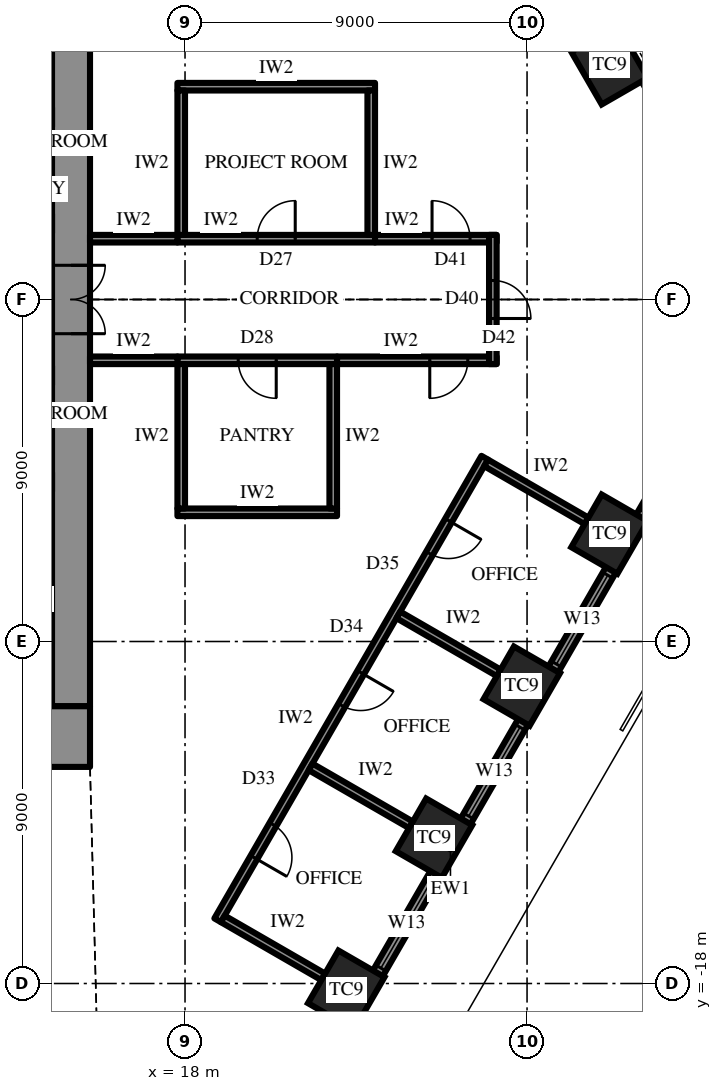
"""IFC4 building model, lengths in metres.
Left out: names, types, materials, properties, quantities, classifications, styles, units other than length and angle.
Written with IfcOpenShell. Run it as: python <this file> out.ifc"""

import sys

from ifc_helpers import new_model, si_unit, direction, frame, frame_2d, origin, origin_2d, place, context, subcontext, project, spatial, rectangle, extrude, element, fill, save


model = new_model("IFC4")
c1 = context("Model", 3, precision=1e-05, world=origin(), true_north=direction((0.0, 1.0)))
c2 = subcontext(c1, "Body", "Model", "MODEL_VIEW")
j1 = project(units=[si_unit("LENGTHUNIT", "METRE"), si_unit("PLANEANGLEUNIT", "RADIAN")], contexts=[c1])
p1 = place(None, origin())
s1 = spatial("IfcSite", under=j1, at=p1, CompositionType="ELEMENT")
p2 = place(p1, origin())
s2 = spatial("IfcBuilding", under=s1, at=p2, CompositionType="ELEMENT")
p3 = place(p2, frame((0.0, 0.0, 228.1)))
s3 = spatial("IfcBuildingStorey", under=s2, at=p3, CompositionType="ELEMENT", Elevation=228.1)
for number, where, z_axis, x_axis in (
    (1, (29.171, 6.175, 0.0), (0.0, 0.0, 1.0), (-0.5, 0.866, 0.0)),
    (2, (22.242, -18.175, 0.0), (0.0, 0.0, 1.0), (0.5, 0.866, 0.0)),
    (3, (24.552, -14.175, 0.0), (0.0, 0.0, 1.0), (0.5, 0.866, 0.0)),
    (4, (26.861, -10.175, 0.0), (0.0, 0.0, 1.0), (0.5, 0.866, 0.0)),
    (5, (29.171, -6.175, 0.0), (0.0, 0.0, 1.0), (0.5, 0.866, 0.0)),
):
    element("IfcColumn", number, at=place(p3, frame(where, z_axis=z_axis, x_axis=x_axis)), inside=s3, PredefinedType="COLUMN", context=c2, shape_type="SweptSolid", body=[
        extrude(rectangle(XDim=1.6, YDim=1.4, at=origin_2d()), origin(), (0.0, 0.0, 1.0), 4.2),
    ])
p4 = place(p3, frame((15.5, -11.5, 0.0), z_axis=(0.0, 0.0, 1.0), x_axis=(-1.0, 0.0, 0.0)))
e6 = element("IfcWall", 6, at=p4, inside=s3, PredefinedType="SHEAR", context=c2, shape_type="SweptSolid", body=[
    extrude(rectangle(XDim=31.0, YDim=1.6, at=frame_2d((15.5, 0.0))), origin(), (0.0, 0.0, 1.0), 4.2),
])
p5 = place(p4, frame((16.35, 0.0, 0.0)))
e7 = element("IfcOpeningElement", 7, at=p5, cuts=e6, PredefinedType="OPENING", context=c2, shape_type="SweptSolid", body=[
    extrude(rectangle(XDim=0.9, YDim=2.2, at=frame_2d((0.45, 1.1))), frame((0.0, 0.81, 0.0), z_axis=(0.0, -1.0, 0.0), x_axis=(1.0, 0.0, 0.0)), (0.0, 0.0, 1.0), 1.62),
])
p6 = place(p4, frame((19.35, 0.0, 0.0)))
e8 = element("IfcOpeningElement", 8, at=p6, cuts=e6, PredefinedType="OPENING", context=c2, shape_type="SweptSolid", body=[
    extrude(rectangle(XDim=0.9, YDim=2.2, at=frame_2d((0.45, 1.1))), frame((0.0, 0.81, 0.0), z_axis=(0.0, -1.0, 0.0), x_axis=(1.0, 0.0, 0.0)), (0.0, 0.0, 1.0), 1.62),
])
p7 = place(p4, frame((22.4, 0.0, 0.0)))
e9 = element("IfcOpeningElement", 9, at=p7, cuts=e6, PredefinedType="OPENING", context=c2, shape_type="SweptSolid", body=[
    extrude(rectangle(XDim=1.0, YDim=2.2, at=frame_2d((0.5, 1.1))), frame((0.0, 0.81, 0.0), z_axis=(0.0, -1.0, 0.0), x_axis=(1.0, 0.0, 0.0)), (0.0, 0.0, 1.0), 1.62),
])
p8 = place(p4, frame((1.65, 0.0, 0.0)))
e10 = element("IfcOpeningElement", 10, at=p8, cuts=e6, PredefinedType="OPENING", context=c2, shape_type="SweptSolid", body=[
    extrude(rectangle(XDim=0.9, YDim=2.2, at=frame_2d((0.45, 1.1))), frame((0.0, 0.81, 0.0), z_axis=(0.0, -1.0, 0.0), x_axis=(1.0, 0.0, 0.0)), (0.0, 0.0, 1.0), 1.62),
])
p9 = place(p4, frame((4.65, 0.0, 0.0)))
e11 = element("IfcOpeningElement", 11, at=p9, cuts=e6, PredefinedType="OPENING", context=c2, shape_type="SweptSolid", body=[
    extrude(rectangle(XDim=0.9, YDim=2.2, at=frame_2d((0.45, 1.1))), frame((0.0, 0.81, 0.0), z_axis=(0.0, -1.0, 0.0), x_axis=(1.0, 0.0, 0.0)), (0.0, 0.0, 1.0), 1.62),
])
p10 = place(p4, frame((25.45, 0.0, 0.0)))
e12 = element("IfcOpeningElement", 12, at=p10, cuts=e6, PredefinedType="OPENING", context=c2, shape_type="SweptSolid", body=[
    extrude(rectangle(XDim=0.9, YDim=2.2, at=frame_2d((0.45, 1.1))), frame((0.0, 0.81, 0.0), z_axis=(0.0, -1.0, 0.0), x_axis=(1.0, 0.0, 0.0)), (0.0, 0.0, 1.0), 1.62),
])
p11 = place(p4, frame((28.45, 0.0, 0.0)))
e13 = element("IfcOpeningElement", 13, at=p11, cuts=e6, PredefinedType="OPENING", context=c2, shape_type="SweptSolid", body=[
    extrude(rectangle(XDim=0.9, YDim=2.2, at=frame_2d((0.45, 1.1))), frame((0.0, 0.81, 0.0), z_axis=(0.0, -1.0, 0.0), x_axis=(1.0, 0.0, 0.0)), (0.0, 0.0, 1.0), 1.62),
])
p12 = place(p3, frame((15.0, -10.7, 0.0), z_axis=(0.0, 0.0, 1.0), x_axis=(0.0, 1.0, 0.0)))
e14 = element("IfcWall", 14, at=p12, inside=s3, PredefinedType="SHEAR", context=c2, shape_type="SweptSolid", body=[
    extrude(rectangle(XDim=21.4, YDim=1.0, at=frame_2d((10.7, 0.0))), origin(), (0.0, 0.0, 1.0), 4.2),
])
p13 = place(p12, frame((9.8, 0.0, 0.0)))
e15 = element("IfcOpeningElement", 15, at=p13, cuts=e14, PredefinedType="OPENING", context=c2, shape_type="SweptSolid", body=[
    extrude(rectangle(XDim=1.8, YDim=2.4, at=frame_2d((0.9, 1.2))), frame((0.0, 0.51, 0.0), z_axis=(0.0, -1.0, 0.0), x_axis=(1.0, 0.0, 0.0)), (0.0, 0.0, 1.0), 1.02),
])
p14 = place(p3, frame((12.3, 2.0, 0.0), z_axis=(0.0, 0.0, 1.0), x_axis=(1.0, 0.0, 0.0)))
e16 = element("IfcWall", 16, at=p14, inside=s3, PredefinedType="SHEAR", context=c2, shape_type="SweptSolid", body=[
    extrude(rectangle(XDim=2.2, YDim=0.5, at=frame_2d((1.1, 0.0))), origin(), (0.0, 0.0, 1.0), 4.2),
])
p15 = place(p14, frame((0.8, 0.0, 0.0)))
e17 = element("IfcOpeningElement", 17, at=p15, cuts=e16, PredefinedType="OPENING", context=c2, shape_type="SweptSolid", body=[
    extrude(rectangle(XDim=0.9, YDim=2.2, at=frame_2d((0.45, 1.1))), frame((0.0, 0.26, 0.0), z_axis=(0.0, -1.0, 0.0), x_axis=(1.0, 0.0, 0.0)), (0.0, 0.0, 1.0), 0.52),
])
p16 = place(p3, frame((12.3, 4.8, 0.0), z_axis=(0.0, 0.0, 1.0), x_axis=(1.0, 0.0, 0.0)))
e18 = element("IfcWall", 18, at=p16, inside=s3, PredefinedType="SHEAR", context=c2, shape_type="SweptSolid", body=[
    extrude(rectangle(XDim=2.2, YDim=0.5, at=frame_2d((1.1, 0.0))), origin(), (0.0, 0.0, 1.0), 4.2),
])
p17 = place(p3, frame((18.057, -26.425, 0.0), z_axis=(0.0, 0.0, 1.0), x_axis=(0.500001051461, 0.866024796723, 0.0)))
e19 = element("IfcWall", 19, at=p17, inside=s3, PredefinedType="SOLIDWALL", context=c2, shape_type="SweptSolid", body=[
    extrude(rectangle(XDim=27.713, YDim=0.3, at=frame_2d((13.856, 0.0))), origin(), (0.0, 0.0, 1.0), 2.0),
])
p18 = place(p17, frame((0.959, 0.0, 0.6)))
e20 = element("IfcOpeningElement", 20, at=p18, cuts=e19, PredefinedType="OPENING", context=c2, shape_type="SweptSolid", body=[
    extrude(rectangle(XDim=2.7, YDim=1.15, at=frame_2d((1.35, 0.575))), frame((0.0, 0.16, 0.0), z_axis=(0.0, -1.0, 0.0), x_axis=(1.0, 0.0, 0.0)), (0.0, 0.0, 1.0), 0.32),
])
p19 = place(p17, frame((5.578, 0.0, 0.6)))
e21 = element("IfcOpeningElement", 21, at=p19, cuts=e19, PredefinedType="OPENING", context=c2, shape_type="SweptSolid", body=[
    extrude(rectangle(XDim=2.7, YDim=1.15, at=frame_2d((1.35, 0.575))), frame((0.0, 0.16, 0.0), z_axis=(0.0, -1.0, 0.0), x_axis=(1.0, 0.0, 0.0)), (0.0, 0.0, 1.0), 0.32),
])
p20 = place(p17, frame((10.197, 0.0, 0.6)))
e22 = element("IfcOpeningElement", 22, at=p20, cuts=e19, PredefinedType="OPENING", context=c2, shape_type="SweptSolid", body=[
    extrude(rectangle(XDim=2.7, YDim=1.15, at=frame_2d((1.35, 0.575))), frame((0.0, 0.16, 0.0), z_axis=(0.0, -1.0, 0.0), x_axis=(1.0, 0.0, 0.0)), (0.0, 0.0, 1.0), 0.32),
])
p21 = place(p17, frame((14.816, 0.0, 0.6)))
e23 = element("IfcOpeningElement", 23, at=p21, cuts=e19, PredefinedType="OPENING", context=c2, shape_type="SweptSolid", body=[
    extrude(rectangle(XDim=2.7, YDim=1.15, at=frame_2d((1.35, 0.575))), frame((0.0, 0.16, 0.0), z_axis=(0.0, -1.0, 0.0), x_axis=(1.0, 0.0, 0.0)), (0.0, 0.0, 1.0), 0.32),
])
p22 = place(p17, frame((19.435, 0.0, 0.6)))
e24 = element("IfcOpeningElement", 24, at=p22, cuts=e19, PredefinedType="OPENING", context=c2, shape_type="SweptSolid", body=[
    extrude(rectangle(XDim=2.7, YDim=1.15, at=frame_2d((1.35, 0.575))), frame((0.0, 0.16, 0.0), z_axis=(0.0, -1.0, 0.0), x_axis=(1.0, 0.0, 0.0)), (0.0, 0.0, 1.0), 0.32),
])
p23 = place(p17, frame((24.053, 0.0, 0.6)))
e25 = element("IfcOpeningElement", 25, at=p23, cuts=e19, PredefinedType="OPENING", context=c2, shape_type="SweptSolid", body=[
    extrude(rectangle(XDim=2.7, YDim=1.15, at=frame_2d((1.35, 0.575))), frame((0.0, 0.16, 0.0), z_axis=(0.0, -1.0, 0.0), x_axis=(1.0, 0.0, 0.0)), (0.0, 0.0, 1.0), 0.32),
])
p24 = place(p3, frame((18.858, -16.337, 0.0), z_axis=(0.0, 0.0, 1.0), x_axis=(0.500002095642, 0.866024193862, 0.0)))
e26 = element("IfcWall", 26, at=p24, inside=s3, PredefinedType="PARTITIONING", context=c2, shape_type="SweptSolid", body=[
    extrude(rectangle(XDim=14.057, YDim=0.2, at=frame_2d((7.028, 0.0))), origin(), (0.0, 0.0, 1.0), 4.0),
])
p25 = place(p24, frame((1.909, 0.0, 0.0)))
e27 = element("IfcOpeningElement", 27, at=p25, cuts=e26, PredefinedType="OPENING", context=c2, shape_type="SweptSolid", body=[
    extrude(rectangle(XDim=1.0, YDim=2.2, at=frame_2d((0.5, 1.1))), frame((0.0, 0.11, 0.0), z_axis=(0.0, -1.0, 0.0), x_axis=(1.0, 0.0, 0.0)), (0.0, 0.0, 1.0), 0.22),
])
p26 = place(p24, frame((6.528, 0.0, 0.0)))
e28 = element("IfcOpeningElement", 28, at=p26, cuts=e26, PredefinedType="OPENING", context=c2, shape_type="SweptSolid", body=[
    extrude(rectangle(XDim=1.0, YDim=2.2, at=frame_2d((0.5, 1.1))), frame((0.0, 0.11, 0.0), z_axis=(0.0, -1.0, 0.0), x_axis=(1.0, 0.0, 0.0)), (0.0, 0.0, 1.0), 0.22),
])
p27 = place(p24, frame((11.147, 0.0, 0.0)))
e29 = element("IfcOpeningElement", 29, at=p27, cuts=e26, PredefinedType="OPENING", context=c2, shape_type="SweptSolid", body=[
    extrude(rectangle(XDim=1.0, YDim=2.2, at=frame_2d((0.5, 1.1))), frame((0.0, 0.11, 0.0), z_axis=(0.0, -1.0, 0.0), x_axis=(1.0, 0.0, 0.0)), (0.0, 0.0, 1.0), 0.22),
])
for number, where, z_axis, x_axis in (
    (30, (18.995, -16.3, 0.0), (0.0, 0.0, 1.0), (0.866, -0.5, 0.0)),
    (31, (21.304, -12.3, 0.0), (0.0, 0.0, 1.0), (0.866, -0.5, 0.0)),
    (32, (23.614, -8.3, 0.0), (0.0, 0.0, 1.0), (0.866, -0.5, 0.0)),
    (33, (25.923, -4.3, 0.0), (0.0, 0.0, 1.0), (0.866, -0.5, 0.0)),
):
    element("IfcWall", number, at=place(p3, frame(where, z_axis=z_axis, x_axis=x_axis)), inside=s3, PredefinedType="PARTITIONING", context=c2, shape_type="SweptSolid", body=[
        extrude(rectangle(XDim=3.05, YDim=0.2, at=frame_2d((1.525, 0.0))), origin(), (0.0, 0.0, 1.0), 3.082),
    ])
p28 = place(p3, frame((17.8, 1.6, 0.0), z_axis=(0.0, 0.0, 1.0), x_axis=(1.0, 0.0, 0.0)))
e34 = element("IfcWall", 34, at=p28, inside=s3, PredefinedType="PARTITIONING", context=c2, shape_type="SweptSolid", body=[
    extrude(rectangle(XDim=5.2, YDim=0.2, at=frame_2d((2.6, 0.0))), origin(), (0.0, 0.0, 1.0), 4.0),
])
p29 = place(p28, frame((2.1, 0.0, 0.0)))
e35 = element("IfcOpeningElement", 35, at=p29, cuts=e34, PredefinedType="OPENING", context=c2, shape_type="SweptSolid", body=[
    extrude(rectangle(XDim=1.0, YDim=2.2, at=frame_2d((0.5, 1.1))), frame((0.0, 0.11, 0.0), z_axis=(0.0, -1.0, 0.0), x_axis=(1.0, 0.0, 0.0)), (0.0, 0.0, 1.0), 0.22),
])
p30 = place(p3, frame((17.8, 5.6, 0.0), z_axis=(0.0, 0.0, 1.0), x_axis=(1.0, 0.0, 0.0)))
e36 = element("IfcWall", 36, at=p30, inside=s3, PredefinedType="PARTITIONING", context=c2, shape_type="SweptSolid", body=[
    extrude(rectangle(XDim=5.2, YDim=0.2, at=frame_2d((2.6, 0.0))), origin(), (0.0, 0.0, 1.0), 4.0),
])
for number, where, z_axis, x_axis in (
    (37, (17.9, 1.7, 0.0), (0.0, 0.0, 1.0), (0.0, 1.0, 0.0)),
    (38, (22.9, 1.7, 0.0), (0.0, 0.0, 1.0), (0.0, 1.0, 0.0)),
):
    element("IfcWall", number, at=place(p3, frame(where, z_axis=z_axis, x_axis=x_axis)), inside=s3, PredefinedType="PARTITIONING", context=c2, shape_type="SweptSolid", body=[
        extrude(rectangle(XDim=3.8, YDim=0.2, at=frame_2d((1.9, 0.0))), origin(), (0.0, 0.0, 1.0), 4.0),
    ])
p31 = place(p3, frame((17.8, -1.6, 0.0), z_axis=(0.0, 0.0, 1.0), x_axis=(1.0, 0.0, 0.0)))
e39 = element("IfcWall", 39, at=p31, inside=s3, PredefinedType="PARTITIONING", context=c2, shape_type="SweptSolid", body=[
    extrude(rectangle(XDim=4.2, YDim=0.2, at=frame_2d((2.1, 0.0))), origin(), (0.0, 0.0, 1.0), 4.0),
])
p32 = place(p31, frame((1.6, 0.0, 0.0)))
e40 = element("IfcOpeningElement", 40, at=p32, cuts=e39, PredefinedType="OPENING", context=c2, shape_type="SweptSolid", body=[
    extrude(rectangle(XDim=1.0, YDim=2.2, at=frame_2d((0.5, 1.1))), frame((0.0, 0.11, 0.0), z_axis=(0.0, -1.0, 0.0), x_axis=(1.0, 0.0, 0.0)), (0.0, 0.0, 1.0), 0.22),
])
p33 = place(p3, frame((17.8, -5.6, 0.0), z_axis=(0.0, 0.0, 1.0), x_axis=(1.0, 0.0, 0.0)))
e41 = element("IfcWall", 41, at=p33, inside=s3, PredefinedType="PARTITIONING", context=c2, shape_type="SweptSolid", body=[
    extrude(rectangle(XDim=4.2, YDim=0.2, at=frame_2d((2.1, 0.0))), origin(), (0.0, 0.0, 1.0), 4.0),
])
for number, where, z_axis, x_axis in (
    (42, (17.9, -1.7, 0.0), (0.0, 0.0, 1.0), (0.0, -1.0, 0.0)),
    (43, (21.9, -1.7, 0.0), (0.0, 0.0, 1.0), (0.0, -1.0, 0.0)),
):
    element("IfcWall", number, at=place(p3, frame(where, z_axis=z_axis, x_axis=x_axis)), inside=s3, PredefinedType="PARTITIONING", context=c2, shape_type="SweptSolid", body=[
        extrude(rectangle(XDim=3.8, YDim=0.2, at=frame_2d((1.9, 0.0))), origin(), (0.0, 0.0, 1.0), 4.0),
    ])
p34 = place(p3, frame((15.5, 1.6, 0.0), z_axis=(0.0, 0.0, 1.0), x_axis=(1.0, 0.0, 0.0)))
e44 = element("IfcWall", 44, at=p34, inside=s3, PredefinedType="PARTITIONING", context=c2, shape_type="SweptSolid", body=[
    extrude(rectangle(XDim=2.3, YDim=0.2, at=frame_2d((1.15, 0.0))), origin(), (0.0, 0.0, 1.0), 4.0),
])
p35 = place(p3, frame((23.0, 1.6, 0.0), z_axis=(0.0, 0.0, 1.0), x_axis=(1.0, 0.0, 0.0)))
e45 = element("IfcWall", 45, at=p35, inside=s3, PredefinedType="PARTITIONING", context=c2, shape_type="SweptSolid", body=[
    extrude(rectangle(XDim=3.2, YDim=0.2, at=frame_2d((1.6, 0.0))), origin(), (0.0, 0.0, 1.0), 4.0),
])
p36 = place(p35, frame((1.5, 0.0, 0.0)))
e46 = element("IfcOpeningElement", 46, at=p36, cuts=e45, PredefinedType="OPENING", context=c2, shape_type="SweptSolid", body=[
    extrude(rectangle(XDim=1.0, YDim=2.2, at=frame_2d((0.5, 1.1))), frame((0.0, 0.11, 0.0), z_axis=(0.0, -1.0, 0.0), x_axis=(1.0, 0.0, 0.0)), (0.0, 0.0, 1.0), 0.22),
])
p37 = place(p3, frame((15.5, -1.6, 0.0), z_axis=(0.0, 0.0, 1.0), x_axis=(1.0, 0.0, 0.0)))
e47 = element("IfcWall", 47, at=p37, inside=s3, PredefinedType="PARTITIONING", context=c2, shape_type="SweptSolid", body=[
    extrude(rectangle(XDim=2.3, YDim=0.2, at=frame_2d((1.15, 0.0))), origin(), (0.0, 0.0, 1.0), 4.0),
])
p38 = place(p3, frame((22.0, -1.6, 0.0), z_axis=(0.0, 0.0, 1.0), x_axis=(1.0, 0.0, 0.0)))
e48 = element("IfcWall", 48, at=p38, inside=s3, PredefinedType="PARTITIONING", context=c2, shape_type="SweptSolid", body=[
    extrude(rectangle(XDim=4.2, YDim=0.2, at=frame_2d((2.1, 0.0))), origin(), (0.0, 0.0, 1.0), 4.0),
])
p39 = place(p38, frame((2.44, 0.0, 0.0)))
e49 = element("IfcOpeningElement", 49, at=p39, cuts=e48, PredefinedType="OPENING", context=c2, shape_type="SweptSolid", body=[
    extrude(rectangle(XDim=1.0, YDim=2.2, at=frame_2d((0.5, 1.1))), frame((0.0, 0.11, 0.0), z_axis=(0.0, -1.0, 0.0), x_axis=(1.0, 0.0, 0.0)), (0.0, 0.0, 1.0), 0.22),
])
p40 = place(p3, frame((26.1, -1.7, 0.0), z_axis=(0.0, 0.0, 1.0), x_axis=(0.0, 1.0, 0.0)))
e50 = element("IfcWall", 50, at=p40, inside=s3, PredefinedType="PARTITIONING", context=c2, shape_type="SweptSolid", body=[
    extrude(rectangle(XDim=3.4, YDim=0.2, at=frame_2d((1.7, 0.0))), origin(), (0.0, 0.0, 1.0), 4.0),
])
p41 = place(p40, frame((1.2, 0.0, 0.0)))
e51 = element("IfcOpeningElement", 51, at=p41, cuts=e50, PredefinedType="OPENING", context=c2, shape_type="SweptSolid", body=[
    extrude(rectangle(XDim=1.0, YDim=2.2, at=frame_2d((0.5, 1.1))), frame((0.0, 0.11, 0.0), z_axis=(0.0, -1.0, 0.0), x_axis=(1.0, 0.0, 0.0)), (0.0, 0.0, 1.0), 0.22),
])
p42 = place(p20, origin())
e52 = element("IfcWindow", 52, at=p42, inside=s3, PartitioningType="SINGLE_PANEL", PredefinedType="WINDOW", context=c2, shape_type="SweptSolid", body=[
    extrude(rectangle(XDim=2.7, YDim=1.15, at=frame_2d((1.35, 0.575))), frame((0.0, 0.03, 0.0), z_axis=(0.0, -1.0, 0.0), x_axis=(1.0, 0.0, 0.0)), (0.0, 0.0, 1.0), 0.06),
])
fill(e22, e52)
p43 = place(p21, origin())
e53 = element("IfcWindow", 53, at=p43, inside=s3, PartitioningType="SINGLE_PANEL", PredefinedType="WINDOW", context=c2, shape_type="SweptSolid", body=[
    extrude(rectangle(XDim=2.7, YDim=1.15, at=frame_2d((1.35, 0.575))), frame((0.0, 0.03, 0.0), z_axis=(0.0, -1.0, 0.0), x_axis=(1.0, 0.0, 0.0)), (0.0, 0.0, 1.0), 0.06),
])
fill(e23, e53)
p44 = place(p22, origin())
e54 = element("IfcWindow", 54, at=p44, inside=s3, PartitioningType="SINGLE_PANEL", PredefinedType="WINDOW", context=c2, shape_type="SweptSolid", body=[
    extrude(rectangle(XDim=2.7, YDim=1.15, at=frame_2d((1.35, 0.575))), frame((0.0, 0.03, 0.0), z_axis=(0.0, -1.0, 0.0), x_axis=(1.0, 0.0, 0.0)), (0.0, 0.0, 1.0), 0.06),
])
fill(e24, e54)
p45 = place(p13, frame((1.8, 0.0, 0.0), z_axis=(0.0, 0.0, 1.0), x_axis=(-1.0, 0.0, 0.0)))
e55 = element("IfcDoor", 55, at=p45, inside=s3, OperationType="DOUBLE_DOOR_SINGLE_SWING", PredefinedType="DOOR", context=c2, shape_type="SweptSolid", body=[
    extrude(rectangle(XDim=1.8, YDim=2.4, at=frame_2d((0.9, 1.2))), frame((0.0, 0.025, 0.0), z_axis=(0.0, -1.0, 0.0), x_axis=(1.0, 0.0, 0.0)), (0.0, 0.0, 1.0), 0.05),
])
fill(e15, e55)
p46 = place(p25, frame((1.0, 0.0, 0.0), z_axis=(0.0, 0.0, 1.0), x_axis=(-1.0, 0.0, 0.0)))
e56 = element("IfcDoor", 56, at=p46, inside=s3, OperationType="SINGLE_SWING_LEFT", PredefinedType="DOOR", context=c2, shape_type="SweptSolid", body=[
    extrude(rectangle(XDim=1.0, YDim=2.2, at=frame_2d((0.5, 1.1))), frame((0.0, 0.025, 0.0), z_axis=(0.0, -1.0, 0.0), x_axis=(1.0, 0.0, 0.0)), (0.0, 0.0, 1.0), 0.05),
])
fill(e27, e56)
p47 = place(p26, frame((1.0, 0.0, 0.0), z_axis=(0.0, 0.0, 1.0), x_axis=(-1.0, 0.0, 0.0)))
e57 = element("IfcDoor", 57, at=p47, inside=s3, OperationType="SINGLE_SWING_RIGHT", PredefinedType="DOOR", context=c2, shape_type="SweptSolid", body=[
    extrude(rectangle(XDim=1.0, YDim=2.2, at=frame_2d((0.5, 1.1))), frame((0.0, 0.025, 0.0), z_axis=(0.0, -1.0, 0.0), x_axis=(1.0, 0.0, 0.0)), (0.0, 0.0, 1.0), 0.05),
])
fill(e28, e57)
p48 = place(p27, frame((1.0, 0.0, 0.0), z_axis=(0.0, 0.0, 1.0), x_axis=(-1.0, 0.0, 0.0)))
e58 = element("IfcDoor", 58, at=p48, inside=s3, OperationType="SINGLE_SWING_RIGHT", PredefinedType="DOOR", context=c2, shape_type="SweptSolid", body=[
    extrude(rectangle(XDim=1.0, YDim=2.2, at=frame_2d((0.5, 1.1))), frame((0.0, 0.025, 0.0), z_axis=(0.0, -1.0, 0.0), x_axis=(1.0, 0.0, 0.0)), (0.0, 0.0, 1.0), 0.05),
])
fill(e29, e58)
p49 = place(p29, origin())
e59 = element("IfcDoor", 59, at=p49, inside=s3, OperationType="SINGLE_SWING_LEFT", PredefinedType="DOOR", context=c2, shape_type="SweptSolid", body=[
    extrude(rectangle(XDim=1.0, YDim=2.2, at=frame_2d((0.5, 1.1))), frame((0.0, 0.025, 0.0), z_axis=(0.0, -1.0, 0.0), x_axis=(1.0, 0.0, 0.0)), (0.0, 0.0, 1.0), 0.05),
])
fill(e35, e59)
p50 = place(p32, frame((1.0, 0.0, 0.0), z_axis=(0.0, 0.0, 1.0), x_axis=(-1.0, 0.0, 0.0)))
e60 = element("IfcDoor", 60, at=p50, inside=s3, OperationType="SINGLE_SWING_RIGHT", PredefinedType="DOOR", context=c2, shape_type="SweptSolid", body=[
    extrude(rectangle(XDim=1.0, YDim=2.2, at=frame_2d((0.5, 1.1))), frame((0.0, 0.025, 0.0), z_axis=(0.0, -1.0, 0.0), x_axis=(1.0, 0.0, 0.0)), (0.0, 0.0, 1.0), 0.05),
])
fill(e40, e60)
p51 = place(p36, origin())
e61 = element("IfcDoor", 61, at=p51, inside=s3, OperationType="SINGLE_SWING_RIGHT", PredefinedType="DOOR", context=c2, shape_type="SweptSolid", body=[
    extrude(rectangle(XDim=1.0, YDim=2.2, at=frame_2d((0.5, 1.1))), frame((0.0, 0.025, 0.0), z_axis=(0.0, -1.0, 0.0), x_axis=(1.0, 0.0, 0.0)), (0.0, 0.0, 1.0), 0.05),
])
fill(e46, e61)
p52 = place(p39, frame((1.0, 0.0, 0.0), z_axis=(0.0, 0.0, 1.0), x_axis=(-1.0, 0.0, 0.0)))
e62 = element("IfcDoor", 62, at=p52, inside=s3, OperationType="SINGLE_SWING_LEFT", PredefinedType="DOOR", context=c2, shape_type="SweptSolid", body=[
    extrude(rectangle(XDim=1.0, YDim=2.2, at=frame_2d((0.5, 1.1))), frame((0.0, 0.025, 0.0), z_axis=(0.0, -1.0, 0.0), x_axis=(1.0, 0.0, 0.0)), (0.0, 0.0, 1.0), 0.05),
])
fill(e49, e62)
p53 = place(p41, frame((1.0, 0.0, 0.0), z_axis=(0.0, 0.0, 1.0), x_axis=(-1.0, 0.0, 0.0)))
e63 = element("IfcDoor", 63, at=p53, inside=s3, OperationType="SINGLE_SWING_LEFT", PredefinedType="DOOR", context=c2, shape_type="SweptSolid", body=[
    extrude(rectangle(XDim=1.0, YDim=2.2, at=frame_2d((0.5, 1.1))), frame((0.0, 0.025, 0.0), z_axis=(0.0, -1.0, 0.0), x_axis=(1.0, 0.0, 0.0)), (0.0, 0.0, 1.0), 0.05),
])
fill(e51, e63)
save(model, sys.argv[1])
